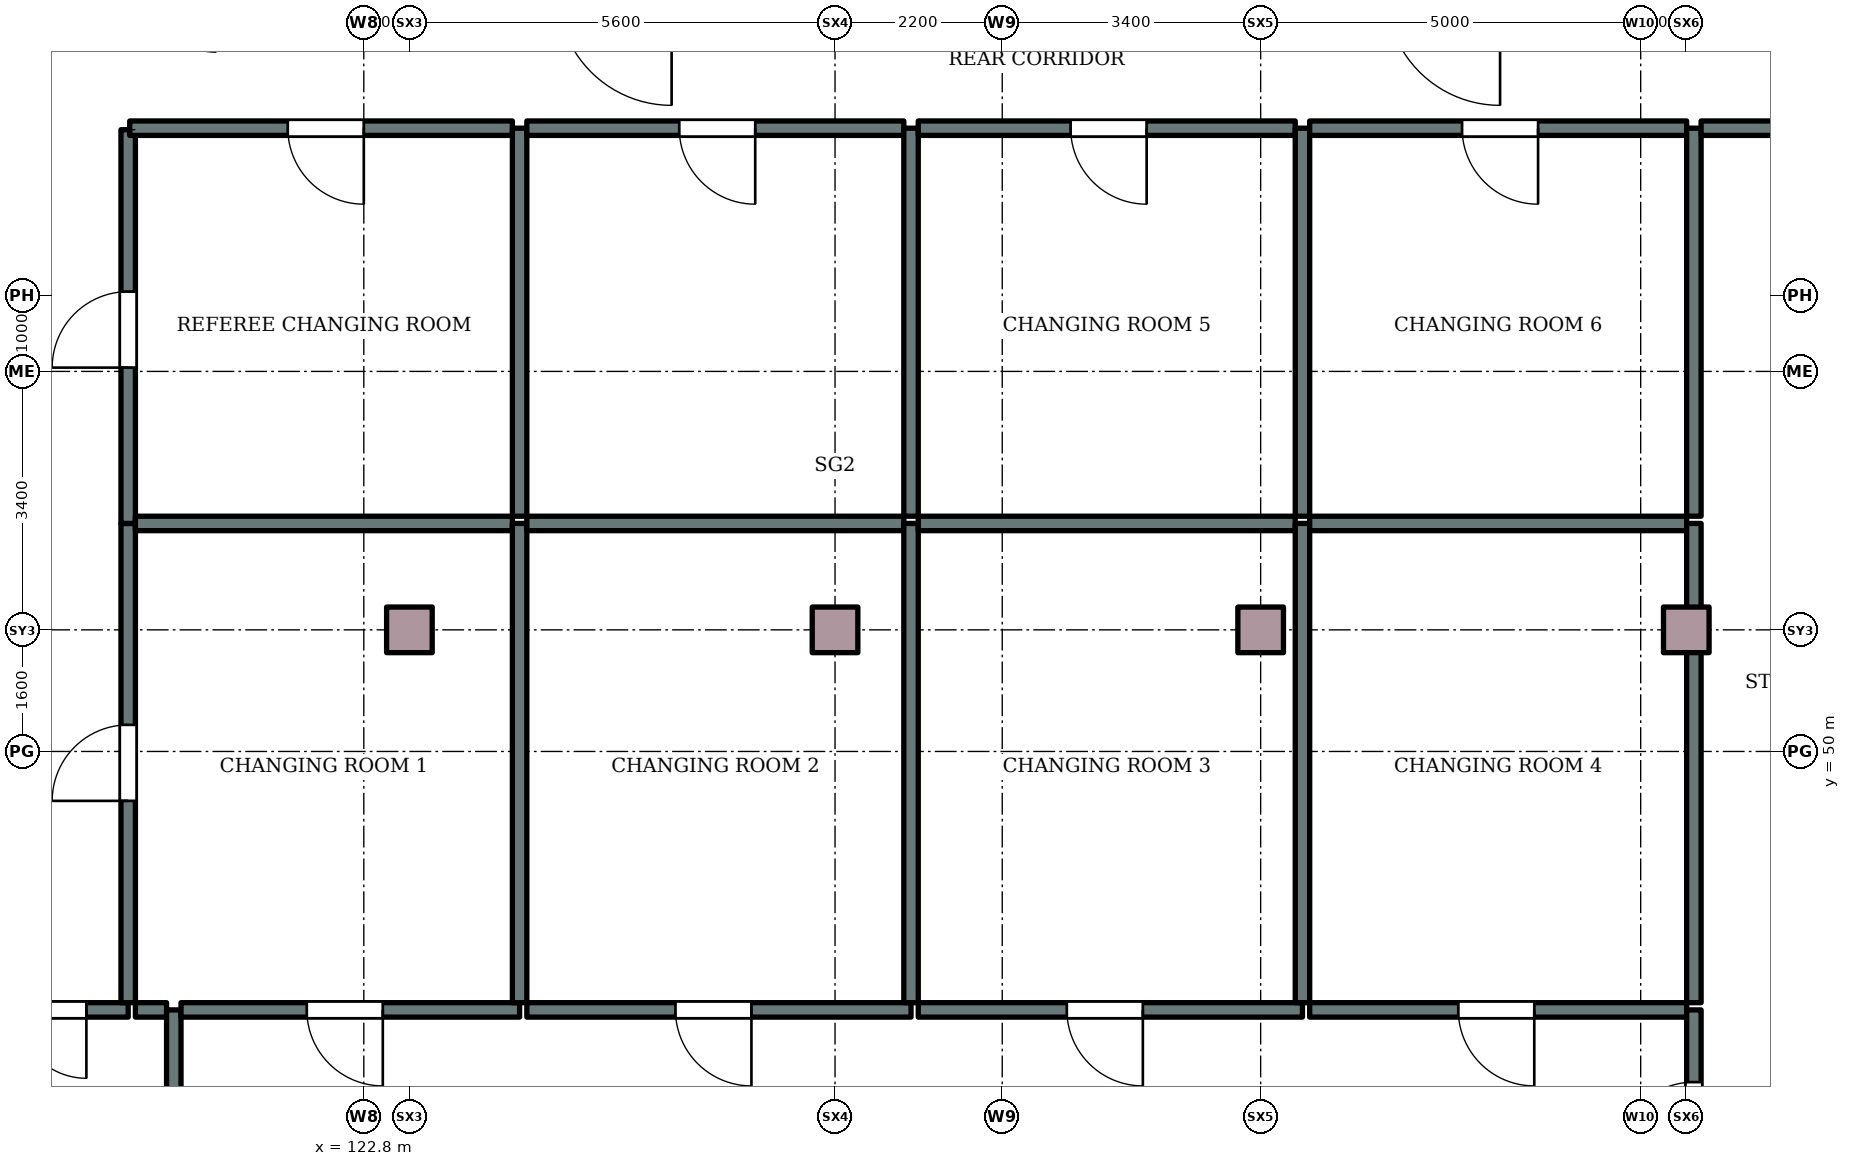
"""IFC4 building model, lengths in metres.
Left out: names, types, materials, properties, quantities, classifications, styles, units other than length and angle.
Written with IfcOpenShell. Run it as: python <this file> out.ifc"""

import sys

from ifc_helpers import new_model, si_unit, direction, frame, frame_2d, origin, origin_2d, place, context, subcontext, project, spatial, rectangle, extrude, element, fill, save


model = new_model("IFC4")
c1 = context("Model", 3, precision=1e-05, world=origin(), true_north=direction((0.0, 1.0)))
c2 = subcontext(c1, "Body", "Model", "MODEL_VIEW")
j1 = project(units=[si_unit("LENGTHUNIT", "METRE"), si_unit("PLANEANGLEUNIT", "RADIAN")], contexts=[c1])
p1 = place(None, origin())
s1 = spatial("IfcSite", under=j1, at=p1, CompositionType="ELEMENT")
p2 = place(p1, origin())
s2 = spatial("IfcBuilding", under=s1, at=p2, CompositionType="ELEMENT")
p3 = place(p2, origin())
s3 = spatial("IfcBuildingStorey", under=s2, at=p3, CompositionType="ELEMENT", Elevation=0.0)
for number, where, z_axis, x_axis in (
    (1, (123.4, 51.6, 0.0), (0.0, 0.0, 1.0), (1.0, 0.0, 0.0)),
    (2, (129.0, 51.6, 0.0), (0.0, 0.0, 1.0), (1.0, 0.0, 0.0)),
    (3, (134.6, 51.6, 0.0), (0.0, 0.0, 1.0), (1.0, 0.0, 0.0)),
    (4, (140.2, 51.6, 0.0), (0.0, 0.0, 1.0), (1.0, 0.0, 0.0)),
):
    element("IfcColumn", number, at=place(p3, frame(where, z_axis=z_axis, x_axis=x_axis)), inside=s3, PredefinedType="COLUMN", context=c2, shape_type="SweptSolid", body=[
        extrude(rectangle(XDim=0.6, YDim=0.6, at=origin_2d()), origin(), (0.0, 0.0, 1.0), 4.2),
    ])
p4 = place(p3, frame((119.7, 46.6, 0.0), z_axis=(0.0, 0.0, 1.0), x_axis=(-1.0, 0.0, 0.0)))
e5 = element("IfcWall", 5, at=p4, inside=s3, PredefinedType="PARTITIONING", context=c2, shape_type="SweptSolid", body=[
    extrude(rectangle(XDim=1.905, YDim=0.19, at=frame_2d((0.953, 0.0))), origin(), (0.0, 0.0, 1.0), 3.9),
])
p5 = place(p4, frame((0.55, 0.0, 0.0)))
e6 = element("IfcOpeningElement", 6, at=p5, cuts=e5, PredefinedType="OPENING", context=c2, shape_type="SweptSolid", body=[
    extrude(rectangle(XDim=0.9, YDim=2.1, at=frame_2d((0.45, 1.05))), frame((0.0, 0.105, 0.0), z_axis=(0.0, -1.0, 0.0), x_axis=(1.0, 0.0, 0.0)), (0.0, 0.0, 1.0), 0.21),
])
p6 = place(p3, frame((119.7, 46.695, 0.0), z_axis=(0.0, 0.0, 1.0), x_axis=(0.0, 1.0, 0.0)))
e7 = element("IfcWall", 7, at=p6, inside=s3, PredefinedType="PARTITIONING", context=c2, shape_type="SweptSolid", body=[
    extrude(rectangle(XDim=6.305, YDim=0.19, at=frame_2d((3.152, 0.0))), origin(), (0.0, 0.0, 1.0), 3.9),
])
p7 = place(p6, frame((2.655, 0.0, 0.0)))
e8 = element("IfcOpeningElement", 8, at=p7, cuts=e7, PredefinedType="OPENING", context=c2, shape_type="SweptSolid", body=[
    extrude(rectangle(XDim=1.0, YDim=2.1, at=frame_2d((0.5, 1.05))), frame((0.0, 0.105, 0.0), z_axis=(0.0, -1.0, 0.0), x_axis=(1.0, 0.0, 0.0)), (0.0, 0.0, 1.0), 0.21),
])
p8 = place(p3, frame((119.7, 53.0, 0.0), z_axis=(0.0, 0.0, 1.0), x_axis=(0.0, 1.0, 0.0)))
e9 = element("IfcWall", 9, at=p8, inside=s3, PredefinedType="PARTITIONING", context=c2, shape_type="SweptSolid", body=[
    extrude(rectangle(XDim=5.18, YDim=0.19, at=frame_2d((2.59, 0.0))), origin(), (0.0, 0.0, 1.0), 3.9),
])
p9 = place(p8, frame((2.05, 0.0, 0.0)))
e10 = element("IfcOpeningElement", 10, at=p9, cuts=e9, PredefinedType="OPENING", context=c2, shape_type="SweptSolid", body=[
    extrude(rectangle(XDim=1.0, YDim=2.1, at=frame_2d((0.5, 1.05))), frame((0.0, 0.105, 0.0), z_axis=(0.0, -1.0, 0.0), x_axis=(1.0, 0.0, 0.0)), (0.0, 0.0, 1.0), 0.21),
])
p10 = place(p3, frame((120.205, 46.6, 0.0), z_axis=(0.0, 0.0, 1.0), x_axis=(-1.0, 0.0, 0.0)))
e11 = element("IfcWall", 11, at=p10, inside=s3, PredefinedType="PARTITIONING", context=c2, shape_type="SweptSolid", body=[
    extrude(rectangle(XDim=0.41, YDim=0.19, at=frame_2d((0.205, 0.0))), origin(), (0.0, 0.0, 1.0), 3.9),
])
p11 = place(p3, frame((120.3, 43.695, 0.0), z_axis=(0.0, 0.0, 1.0), x_axis=(0.0, 1.0, 0.0)))
e12 = element("IfcWall", 12, at=p11, inside=s3, PredefinedType="PARTITIONING", context=c2, shape_type="SweptSolid", body=[
    extrude(rectangle(XDim=2.905, YDim=0.19, at=frame_2d((1.453, 0.0))), origin(), (0.0, 0.0, 1.0), 3.9),
])
p12 = place(p11, frame((0.955, 0.0, 0.0)))
e13 = element("IfcOpeningElement", 13, at=p12, cuts=e12, PredefinedType="OPENING", context=c2, shape_type="SweptSolid", body=[
    extrude(rectangle(XDim=0.9, YDim=2.1, at=frame_2d((0.45, 1.05))), frame((0.0, 0.105, 0.0), z_axis=(0.0, -1.0, 0.0), x_axis=(1.0, 0.0, 0.0)), (0.0, 0.0, 1.0), 0.21),
])
p13 = place(p3, frame((124.755, 53.0, 0.0), z_axis=(0.0, 0.0, 1.0), x_axis=(-1.0, 0.0, 0.0)))
e14 = element("IfcWall", 14, at=p13, inside=s3, PredefinedType="PARTITIONING", context=c2, shape_type="SweptSolid", body=[
    extrude(rectangle(XDim=4.96, YDim=0.19, at=frame_2d((2.48, 0.0))), origin(), (0.0, 0.0, 1.0), 3.9),
])
p14 = place(p3, frame((124.755, 58.2, 0.0), z_axis=(0.0, 0.0, 1.0), x_axis=(-1.0, 0.0, 0.0)))
e15 = element("IfcWall", 15, at=p14, inside=s3, PredefinedType="PARTITIONING", context=c2, shape_type="SweptSolid", body=[
    extrude(rectangle(XDim=5.035, YDim=0.19, at=frame_2d((2.518, 0.0))), origin(), (0.0, 0.0, 1.0), 3.9),
])
p15 = place(p14, frame((1.955, 0.0, 0.0)))
e16 = element("IfcOpeningElement", 16, at=p15, cuts=e15, PredefinedType="OPENING", context=c2, shape_type="SweptSolid", body=[
    extrude(rectangle(XDim=1.0, YDim=2.1, at=frame_2d((0.5, 1.05))), frame((0.0, 0.105, 0.0), z_axis=(0.0, -1.0, 0.0), x_axis=(1.0, 0.0, 0.0)), (0.0, 0.0, 1.0), 0.21),
])
p16 = place(p3, frame((124.85, 46.6, 0.0), z_axis=(0.0, 0.0, 1.0), x_axis=(-1.0, 0.0, 0.0)))
e17 = element("IfcWall", 17, at=p16, inside=s3, PredefinedType="PARTITIONING", context=c2, shape_type="SweptSolid", body=[
    extrude(rectangle(XDim=4.455, YDim=0.19, at=frame_2d((2.228, 0.0))), origin(), (0.0, 0.0, 1.0), 3.9),
])
p17 = place(p16, frame((1.8, 0.0, 0.0)))
e18 = element("IfcOpeningElement", 18, at=p17, cuts=e17, PredefinedType="OPENING", context=c2, shape_type="SweptSolid", body=[
    extrude(rectangle(XDim=1.0, YDim=2.1, at=frame_2d((0.5, 1.05))), frame((0.0, 0.105, 0.0), z_axis=(0.0, -1.0, 0.0), x_axis=(1.0, 0.0, 0.0)), (0.0, 0.0, 1.0), 0.21),
])
p18 = place(p3, frame((124.85, 46.695, 0.0), z_axis=(0.0, 0.0, 1.0), x_axis=(0.0, 1.0, 0.0)))
e19 = element("IfcWall", 19, at=p18, inside=s3, PredefinedType="PARTITIONING", context=c2, shape_type="SweptSolid", body=[
    extrude(rectangle(XDim=6.305, YDim=0.19, at=frame_2d((3.152, 0.0))), origin(), (0.0, 0.0, 1.0), 3.9),
])
p19 = place(p3, frame((124.85, 53.095, 0.0), z_axis=(0.0, 0.0, 1.0), x_axis=(0.0, 1.0, 0.0)))
e20 = element("IfcWall", 20, at=p19, inside=s3, PredefinedType="PARTITIONING", context=c2, shape_type="SweptSolid", body=[
    extrude(rectangle(XDim=5.105, YDim=0.19, at=frame_2d((2.552, 0.0))), origin(), (0.0, 0.0, 1.0), 3.9),
])
p20 = place(p3, frame((129.905, 53.0, 0.0), z_axis=(0.0, 0.0, 1.0), x_axis=(-1.0, 0.0, 0.0)))
e21 = element("IfcWall", 21, at=p20, inside=s3, PredefinedType="PARTITIONING", context=c2, shape_type="SweptSolid", body=[
    extrude(rectangle(XDim=4.96, YDim=0.19, at=frame_2d((2.48, 0.0))), origin(), (0.0, 0.0, 1.0), 3.9),
])
p21 = place(p3, frame((129.905, 58.2, 0.0), z_axis=(0.0, 0.0, 1.0), x_axis=(-1.0, 0.0, 0.0)))
e22 = element("IfcWall", 22, at=p21, inside=s3, PredefinedType="PARTITIONING", context=c2, shape_type="SweptSolid", body=[
    extrude(rectangle(XDim=4.96, YDim=0.19, at=frame_2d((2.48, 0.0))), origin(), (0.0, 0.0, 1.0), 3.9),
])
p22 = place(p21, frame((1.955, 0.0, 0.0)))
e23 = element("IfcOpeningElement", 23, at=p22, cuts=e22, PredefinedType="OPENING", context=c2, shape_type="SweptSolid", body=[
    extrude(rectangle(XDim=1.0, YDim=2.1, at=frame_2d((0.5, 1.05))), frame((0.0, 0.105, 0.0), z_axis=(0.0, -1.0, 0.0), x_axis=(1.0, 0.0, 0.0)), (0.0, 0.0, 1.0), 0.21),
])
p23 = place(p3, frame((130.0, 46.6, 0.0), z_axis=(0.0, 0.0, 1.0), x_axis=(-1.0, 0.0, 0.0)))
e24 = element("IfcWall", 24, at=p23, inside=s3, PredefinedType="PARTITIONING", context=c2, shape_type="SweptSolid", body=[
    extrude(rectangle(XDim=5.055, YDim=0.19, at=frame_2d((2.527, 0.0))), origin(), (0.0, 0.0, 1.0), 3.9),
])
p24 = place(p23, frame((2.1, 0.0, 0.0)))
e25 = element("IfcOpeningElement", 25, at=p24, cuts=e24, PredefinedType="OPENING", context=c2, shape_type="SweptSolid", body=[
    extrude(rectangle(XDim=1.0, YDim=2.1, at=frame_2d((0.5, 1.05))), frame((0.0, 0.105, 0.0), z_axis=(0.0, -1.0, 0.0), x_axis=(1.0, 0.0, 0.0)), (0.0, 0.0, 1.0), 0.21),
])
p25 = place(p3, frame((130.0, 46.695, 0.0), z_axis=(0.0, 0.0, 1.0), x_axis=(0.0, 1.0, 0.0)))
e26 = element("IfcWall", 26, at=p25, inside=s3, PredefinedType="PARTITIONING", context=c2, shape_type="SweptSolid", body=[
    extrude(rectangle(XDim=6.305, YDim=0.19, at=frame_2d((3.152, 0.0))), origin(), (0.0, 0.0, 1.0), 3.9),
])
p26 = place(p3, frame((130.0, 53.095, 0.0), z_axis=(0.0, 0.0, 1.0), x_axis=(0.0, 1.0, 0.0)))
e27 = element("IfcWall", 27, at=p26, inside=s3, PredefinedType="PARTITIONING", context=c2, shape_type="SweptSolid", body=[
    extrude(rectangle(XDim=5.105, YDim=0.19, at=frame_2d((2.552, 0.0))), origin(), (0.0, 0.0, 1.0), 3.9),
])
p27 = place(p3, frame((135.055, 53.0, 0.0), z_axis=(0.0, 0.0, 1.0), x_axis=(-1.0, 0.0, 0.0)))
e28 = element("IfcWall", 28, at=p27, inside=s3, PredefinedType="PARTITIONING", context=c2, shape_type="SweptSolid", body=[
    extrude(rectangle(XDim=4.96, YDim=0.19, at=frame_2d((2.48, 0.0))), origin(), (0.0, 0.0, 1.0), 3.9),
])
p28 = place(p3, frame((135.055, 58.2, 0.0), z_axis=(0.0, 0.0, 1.0), x_axis=(-1.0, 0.0, 0.0)))
e29 = element("IfcWall", 29, at=p28, inside=s3, PredefinedType="PARTITIONING", context=c2, shape_type="SweptSolid", body=[
    extrude(rectangle(XDim=4.96, YDim=0.19, at=frame_2d((2.48, 0.0))), origin(), (0.0, 0.0, 1.0), 3.9),
])
p29 = place(p28, frame((1.955, 0.0, 0.0)))
e30 = element("IfcOpeningElement", 30, at=p29, cuts=e29, PredefinedType="OPENING", context=c2, shape_type="SweptSolid", body=[
    extrude(rectangle(XDim=1.0, YDim=2.1, at=frame_2d((0.5, 1.05))), frame((0.0, 0.105, 0.0), z_axis=(0.0, -1.0, 0.0), x_axis=(1.0, 0.0, 0.0)), (0.0, 0.0, 1.0), 0.21),
])
p30 = place(p3, frame((135.15, 46.6, 0.0), z_axis=(0.0, 0.0, 1.0), x_axis=(-1.0, 0.0, 0.0)))
e31 = element("IfcWall", 31, at=p30, inside=s3, PredefinedType="PARTITIONING", context=c2, shape_type="SweptSolid", body=[
    extrude(rectangle(XDim=5.055, YDim=0.19, at=frame_2d((2.527, 0.0))), origin(), (0.0, 0.0, 1.0), 3.9),
])
p31 = place(p30, frame((2.1, 0.0, 0.0)))
e32 = element("IfcOpeningElement", 32, at=p31, cuts=e31, PredefinedType="OPENING", context=c2, shape_type="SweptSolid", body=[
    extrude(rectangle(XDim=1.0, YDim=2.1, at=frame_2d((0.5, 1.05))), frame((0.0, 0.105, 0.0), z_axis=(0.0, -1.0, 0.0), x_axis=(1.0, 0.0, 0.0)), (0.0, 0.0, 1.0), 0.21),
])
p32 = place(p3, frame((135.15, 46.695, 0.0), z_axis=(0.0, 0.0, 1.0), x_axis=(0.0, 1.0, 0.0)))
e33 = element("IfcWall", 33, at=p32, inside=s3, PredefinedType="PARTITIONING", context=c2, shape_type="SweptSolid", body=[
    extrude(rectangle(XDim=6.305, YDim=0.19, at=frame_2d((3.152, 0.0))), origin(), (0.0, 0.0, 1.0), 3.9),
])
p33 = place(p3, frame((135.15, 53.095, 0.0), z_axis=(0.0, 0.0, 1.0), x_axis=(0.0, 1.0, 0.0)))
e34 = element("IfcWall", 34, at=p33, inside=s3, PredefinedType="PARTITIONING", context=c2, shape_type="SweptSolid", body=[
    extrude(rectangle(XDim=5.105, YDim=0.19, at=frame_2d((2.552, 0.0))), origin(), (0.0, 0.0, 1.0), 3.9),
])
p34 = place(p3, frame((140.205, 46.6, 0.0), z_axis=(0.0, 0.0, 1.0), x_axis=(-1.0, 0.0, 0.0)))
e35 = element("IfcWall", 35, at=p34, inside=s3, PredefinedType="PARTITIONING", context=c2, shape_type="SweptSolid", body=[
    extrude(rectangle(XDim=4.96, YDim=0.19, at=frame_2d((2.48, 0.0))), origin(), (0.0, 0.0, 1.0), 3.9),
])
p35 = place(p34, frame((2.005, 0.0, 0.0)))
e36 = element("IfcOpeningElement", 36, at=p35, cuts=e35, PredefinedType="OPENING", context=c2, shape_type="SweptSolid", body=[
    extrude(rectangle(XDim=1.0, YDim=2.1, at=frame_2d((0.5, 1.05))), frame((0.0, 0.105, 0.0), z_axis=(0.0, -1.0, 0.0), x_axis=(1.0, 0.0, 0.0)), (0.0, 0.0, 1.0), 0.21),
])
p36 = place(p3, frame((140.205, 53.0, 0.0), z_axis=(0.0, 0.0, 1.0), x_axis=(-1.0, 0.0, 0.0)))
e37 = element("IfcWall", 37, at=p36, inside=s3, PredefinedType="PARTITIONING", context=c2, shape_type="SweptSolid", body=[
    extrude(rectangle(XDim=4.96, YDim=0.19, at=frame_2d((2.48, 0.0))), origin(), (0.0, 0.0, 1.0), 3.9),
])
p37 = place(p3, frame((140.205, 58.2, 0.0), z_axis=(0.0, 0.0, 1.0), x_axis=(-1.0, 0.0, 0.0)))
e38 = element("IfcWall", 38, at=p37, inside=s3, PredefinedType="PARTITIONING", context=c2, shape_type="SweptSolid", body=[
    extrude(rectangle(XDim=4.96, YDim=0.19, at=frame_2d((2.48, 0.0))), origin(), (0.0, 0.0, 1.0), 3.9),
])
p38 = place(p37, frame((1.955, 0.0, 0.0)))
e39 = element("IfcOpeningElement", 39, at=p38, cuts=e38, PredefinedType="OPENING", context=c2, shape_type="SweptSolid", body=[
    extrude(rectangle(XDim=1.0, YDim=2.1, at=frame_2d((0.5, 1.05))), frame((0.0, 0.105, 0.0), z_axis=(0.0, -1.0, 0.0), x_axis=(1.0, 0.0, 0.0)), (0.0, 0.0, 1.0), 0.21),
])
p39 = place(p3, frame((140.3, 43.68, 0.0), z_axis=(0.0, 0.0, 1.0), x_axis=(0.0, 1.0, 0.0)))
e40 = element("IfcWall", 40, at=p39, inside=s3, PredefinedType="PARTITIONING", context=c2, shape_type="SweptSolid", body=[
    extrude(rectangle(XDim=2.92, YDim=0.19, at=frame_2d((1.46, 0.0))), origin(), (0.0, 0.0, 1.0), 3.9),
])
p40 = place(p39, frame((0.97, 0.0, 0.0)))
e41 = element("IfcOpeningElement", 41, at=p40, cuts=e40, PredefinedType="OPENING", context=c2, shape_type="SweptSolid", body=[
    extrude(rectangle(XDim=1.0, YDim=2.1, at=frame_2d((0.5, 1.05))), frame((0.0, 0.105, 0.0), z_axis=(0.0, -1.0, 0.0), x_axis=(1.0, 0.0, 0.0)), (0.0, 0.0, 1.0), 0.21),
])
p41 = place(p3, frame((140.3, 46.695, 0.0), z_axis=(0.0, 0.0, 1.0), x_axis=(0.0, 1.0, 0.0)))
e42 = element("IfcWall", 42, at=p41, inside=s3, PredefinedType="PARTITIONING", context=c2, shape_type="SweptSolid", body=[
    extrude(rectangle(XDim=6.305, YDim=0.19, at=frame_2d((3.152, 0.0))), origin(), (0.0, 0.0, 1.0), 3.9),
])
p42 = place(p3, frame((140.3, 53.095, 0.0), z_axis=(0.0, 0.0, 1.0), x_axis=(0.0, 1.0, 0.0)))
e43 = element("IfcWall", 43, at=p42, inside=s3, PredefinedType="PARTITIONING", context=c2, shape_type="SweptSolid", body=[
    extrude(rectangle(XDim=5.105, YDim=0.19, at=frame_2d((2.552, 0.0))), origin(), (0.0, 0.0, 1.0), 3.9),
])
p43 = place(p3, frame((140.395, 58.2, 0.0), z_axis=(0.0, 0.0, 1.0), x_axis=(1.0, 0.0, 0.0)))
e44 = element("IfcWall", 44, at=p43, inside=s3, PredefinedType="PARTITIONING", context=c2, shape_type="SweptSolid", body=[
    extrude(rectangle(XDim=5.125, YDim=0.19, at=frame_2d((2.562, 0.0))), origin(), (0.0, 0.0, 1.0), 3.9),
])
p44 = place(p43, frame((1.955, 0.0, 0.0)))
e45 = element("IfcOpeningElement", 45, at=p44, cuts=e44, PredefinedType="OPENING", context=c2, shape_type="SweptSolid", body=[
    extrude(rectangle(XDim=1.0, YDim=2.1, at=frame_2d((0.5, 1.05))), frame((0.0, 0.105, 0.0), z_axis=(0.0, -1.0, 0.0), x_axis=(1.0, 0.0, 0.0)), (0.0, 0.0, 1.0), 0.21),
])
p45 = place(p5, origin())
e46 = element("IfcDoor", 46, at=p45, inside=s3, OperationType="SINGLE_SWING_LEFT", PredefinedType="DOOR", context=c2, shape_type="SweptSolid", body=[
    extrude(rectangle(XDim=0.9, YDim=2.1, at=frame_2d((0.45, 1.05))), frame((0.0, 0.025, 0.0), z_axis=(0.0, -1.0, 0.0), x_axis=(1.0, 0.0, 0.0)), (0.0, 0.0, 1.0), 0.05),
])
fill(e6, e46)
p46 = place(p17, origin())
e47 = element("IfcDoor", 47, at=p46, inside=s3, OperationType="SINGLE_SWING_LEFT", PredefinedType="DOOR", context=c2, shape_type="SweptSolid", body=[
    extrude(rectangle(XDim=1.0, YDim=2.1, at=frame_2d((0.5, 1.05))), frame((0.0, 0.025, 0.0), z_axis=(0.0, -1.0, 0.0), x_axis=(1.0, 0.0, 0.0)), (0.0, 0.0, 1.0), 0.05),
])
fill(e18, e47)
p47 = place(p7, origin())
e48 = element("IfcDoor", 48, at=p47, inside=s3, OperationType="SINGLE_SWING_LEFT", PredefinedType="DOOR", context=c2, shape_type="SweptSolid", body=[
    extrude(rectangle(XDim=1.0, YDim=2.1, at=frame_2d((0.5, 1.05))), frame((0.0, 0.025, 0.0), z_axis=(0.0, -1.0, 0.0), x_axis=(1.0, 0.0, 0.0)), (0.0, 0.0, 1.0), 0.05),
])
fill(e8, e48)
p48 = place(p24, origin())
e49 = element("IfcDoor", 49, at=p48, inside=s3, OperationType="SINGLE_SWING_LEFT", PredefinedType="DOOR", context=c2, shape_type="SweptSolid", body=[
    extrude(rectangle(XDim=1.0, YDim=2.1, at=frame_2d((0.5, 1.05))), frame((0.0, 0.025, 0.0), z_axis=(0.0, -1.0, 0.0), x_axis=(1.0, 0.0, 0.0)), (0.0, 0.0, 1.0), 0.05),
])
fill(e25, e49)
p49 = place(p31, origin())
e50 = element("IfcDoor", 50, at=p49, inside=s3, OperationType="SINGLE_SWING_LEFT", PredefinedType="DOOR", context=c2, shape_type="SweptSolid", body=[
    extrude(rectangle(XDim=1.0, YDim=2.1, at=frame_2d((0.5, 1.05))), frame((0.0, 0.025, 0.0), z_axis=(0.0, -1.0, 0.0), x_axis=(1.0, 0.0, 0.0)), (0.0, 0.0, 1.0), 0.05),
])
fill(e32, e50)
p50 = place(p35, origin())
e51 = element("IfcDoor", 51, at=p50, inside=s3, OperationType="SINGLE_SWING_LEFT", PredefinedType="DOOR", context=c2, shape_type="SweptSolid", body=[
    extrude(rectangle(XDim=1.0, YDim=2.1, at=frame_2d((0.5, 1.05))), frame((0.0, 0.025, 0.0), z_axis=(0.0, -1.0, 0.0), x_axis=(1.0, 0.0, 0.0)), (0.0, 0.0, 1.0), 0.05),
])
fill(e36, e51)
p51 = place(p9, origin())
e52 = element("IfcDoor", 52, at=p51, inside=s3, OperationType="SINGLE_SWING_LEFT", PredefinedType="DOOR", context=c2, shape_type="SweptSolid", body=[
    extrude(rectangle(XDim=1.0, YDim=2.1, at=frame_2d((0.5, 1.05))), frame((0.0, 0.025, 0.0), z_axis=(0.0, -1.0, 0.0), x_axis=(1.0, 0.0, 0.0)), (0.0, 0.0, 1.0), 0.05),
])
fill(e10, e52)
p52 = place(p15, origin())
e53 = element("IfcDoor", 53, at=p52, inside=s3, OperationType="SINGLE_SWING_LEFT", PredefinedType="DOOR", context=c2, shape_type="SweptSolid", body=[
    extrude(rectangle(XDim=1.0, YDim=2.1, at=frame_2d((0.5, 1.05))), frame((0.0, 0.025, 0.0), z_axis=(0.0, -1.0, 0.0), x_axis=(1.0, 0.0, 0.0)), (0.0, 0.0, 1.0), 0.05),
])
fill(e16, e53)
p53 = place(p22, origin())
e54 = element("IfcDoor", 54, at=p53, inside=s3, OperationType="SINGLE_SWING_LEFT", PredefinedType="DOOR", context=c2, shape_type="SweptSolid", body=[
    extrude(rectangle(XDim=1.0, YDim=2.1, at=frame_2d((0.5, 1.05))), frame((0.0, 0.025, 0.0), z_axis=(0.0, -1.0, 0.0), x_axis=(1.0, 0.0, 0.0)), (0.0, 0.0, 1.0), 0.05),
])
fill(e23, e54)
p54 = place(p29, origin())
e55 = element("IfcDoor", 55, at=p54, inside=s3, OperationType="SINGLE_SWING_LEFT", PredefinedType="DOOR", context=c2, shape_type="SweptSolid", body=[
    extrude(rectangle(XDim=1.0, YDim=2.1, at=frame_2d((0.5, 1.05))), frame((0.0, 0.025, 0.0), z_axis=(0.0, -1.0, 0.0), x_axis=(1.0, 0.0, 0.0)), (0.0, 0.0, 1.0), 0.05),
])
fill(e30, e55)
p55 = place(p38, origin())
e56 = element("IfcDoor", 56, at=p55, inside=s3, OperationType="SINGLE_SWING_LEFT", PredefinedType="DOOR", context=c2, shape_type="SweptSolid", body=[
    extrude(rectangle(XDim=1.0, YDim=2.1, at=frame_2d((0.5, 1.05))), frame((0.0, 0.025, 0.0), z_axis=(0.0, -1.0, 0.0), x_axis=(1.0, 0.0, 0.0)), (0.0, 0.0, 1.0), 0.05),
])
fill(e39, e56)
p56 = place(p40, origin())
e57 = element("IfcDoor", 57, at=p56, inside=s3, OperationType="SINGLE_SWING_LEFT", PredefinedType="DOOR", context=c2, shape_type="SweptSolid", body=[
    extrude(rectangle(XDim=1.0, YDim=2.1, at=frame_2d((0.5, 1.05))), frame((0.0, 0.025, 0.0), z_axis=(0.0, -1.0, 0.0), x_axis=(1.0, 0.0, 0.0)), (0.0, 0.0, 1.0), 0.05),
])
fill(e41, e57)
save(model, sys.argv[1])
